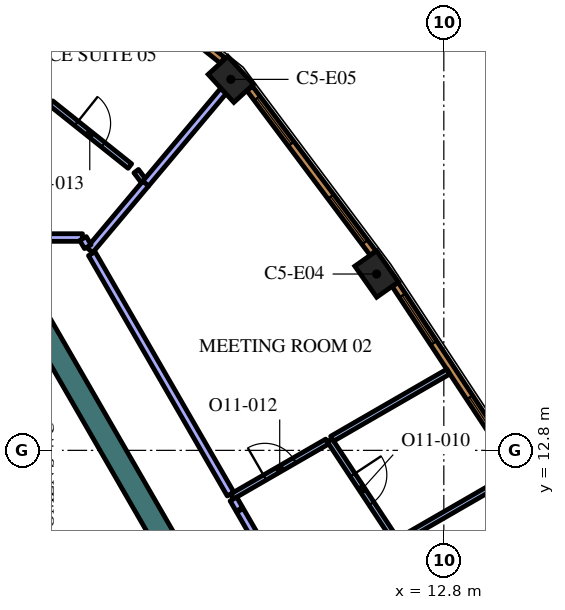
"""IFC4 building model, lengths in metres.
Left out: names, types, materials, properties, quantities, classifications, styles, units other than length and angle.
Written with IfcOpenShell. Run it as: python <this file> out.ifc"""

import sys

from ifc_helpers import new_model, si_unit, direction, frame, frame_2d, origin, origin_2d, place, context, subcontext, project, spatial, rectangle, extrude, element, fill, save


model = new_model("IFC4")
c1 = context("Model", 3, precision=1e-05, world=origin(), true_north=direction((0.0, 1.0)))
c2 = subcontext(c1, "Body", "Model", "MODEL_VIEW")
j1 = project(units=[si_unit("LENGTHUNIT", "METRE"), si_unit("PLANEANGLEUNIT", "RADIAN")], contexts=[c1])
p1 = place(None, origin())
s1 = spatial("IfcSite", under=j1, at=p1, CompositionType="ELEMENT")
p2 = place(p1, origin())
s2 = spatial("IfcBuilding", under=s1, at=p2, CompositionType="ELEMENT")
p3 = place(p2, frame((0.0, 0.0, 267.0)))
s3 = spatial("IfcBuildingStorey", under=s2, at=p3, CompositionType="ELEMENT", Elevation=267.0)
for number, where, z_axis, x_axis in (
    (1, (11.032, 17.44, 0.0), (0.0, 0.0, 1.0), (-0.575, 0.818, 0.0)),
    (2, (7.195, 22.561, 0.0), (0.0, 0.0, 1.0), (-0.676, 0.737, 0.0)),
):
    element("IfcColumn", number, at=place(p3, frame(where, z_axis=z_axis, x_axis=x_axis)), inside=s3, PredefinedType="COLUMN", context=c2, shape_type="SweptSolid", body=[
        extrude(rectangle(XDim=1.0, YDim=0.7, at=origin_2d()), origin(), (0.0, 0.0, 1.0), 4.2),
    ])
p4 = place(p3, frame((1.989, 16.456, 0.0), z_axis=(0.0, 0.0, 1.0), x_axis=(0.499990476767, -0.866030901956, 0.0)))
e3 = element("IfcWall", 3, at=p4, inside=s3, PredefinedType="SOLIDWALL", context=c2, shape_type="SweptSolid", body=[
    extrude(rectangle(XDim=7.438, YDim=0.6, at=frame_2d((3.719, 0.0))), origin(), (0.0, 0.0, 1.0), 4.2),
])
p5 = place(p3, frame((11.564, 10.387, 0.0), z_axis=(0.0, 0.0, 1.0), x_axis=(0.86604641216, 0.499963610661, 0.0)))
e4 = element("IfcWall", 4, at=p5, inside=s3, PredefinedType="PARTITIONING", context=c2, shape_type="SweptSolid", body=[
    extrude(rectangle(XDim=3.096, YDim=0.15, at=frame_2d((1.548, 0.0))), origin(), (0.0, 0.0, 1.0), 3.55),
])
p6 = place(p3, frame((9.795, 13.068, 0.0), z_axis=(0.0, 0.0, 1.0), x_axis=(0.550767347659, -0.834658809786, 0.0)))
e5 = element("IfcWall", 5, at=p6, inside=s3, PredefinedType="PARTITIONING", context=c2, shape_type="SweptSolid", body=[
    extrude(rectangle(XDim=2.999, YDim=0.15, at=frame_2d((1.5, 0.0))), origin(), (0.0, 0.0, 1.0), 3.55),
])
p7 = place(p6, frame((1.099, 0.0, 0.0)))
e6 = element("IfcOpeningElement", 6, at=p7, cuts=e5, PredefinedType="OPENING", context=c2, shape_type="SweptSolid", body=[
    extrude(rectangle(XDim=0.9, YDim=2.1, at=frame_2d((0.45, 1.05))), frame((0.0, 0.085, 0.0), z_axis=(0.0, -1.0, 0.0), x_axis=(1.0, 0.0, 0.0)), (0.0, 0.0, 1.0), 0.17),
])
p8 = place(p3, frame((9.86, 13.106, 0.0), z_axis=(0.0, 0.0, 1.0), x_axis=(0.866022094817, 0.500005731256, 0.0)))
e7 = element("IfcWall", 7, at=p8, inside=s3, PredefinedType="PARTITIONING", context=c2, shape_type="SweptSolid", body=[
    extrude(rectangle(XDim=3.531, YDim=0.15, at=frame_2d((1.766, 0.0))), origin(), (0.0, 0.0, 1.0), 3.55),
])
p9 = place(p3, frame((7.226, 11.585, 0.0), z_axis=(0.0, 0.0, 1.0), x_axis=(0.866021079084, 0.500007490527, 0.0)))
e8 = element("IfcWall", 8, at=p9, inside=s3, PredefinedType="PARTITIONING", context=c2, shape_type="SweptSolid", body=[
    extrude(rectangle(XDim=2.892, YDim=0.15, at=frame_2d((1.446, 0.0))), origin(), (0.0, 0.0, 1.0), 3.55),
])
p10 = place(p9, frame((1.0, 0.0, 0.0)))
e9 = element("IfcOpeningElement", 9, at=p10, cuts=e8, PredefinedType="OPENING", context=c2, shape_type="SweptSolid", body=[
    extrude(rectangle(XDim=0.9, YDim=2.1, at=frame_2d((0.45, 1.05))), frame((0.0, 0.085, 0.0), z_axis=(0.0, -1.0, 0.0), x_axis=(1.0, 0.0, 0.0)), (0.0, 0.0, 1.0), 0.17),
])
p11 = place(p3, frame((13.436, 0.829, 0.0), z_axis=(0.0, 0.0, 1.0), x_axis=(-0.49999894854, 0.866026010844, 0.0)))
e10 = element("IfcWall", 10, at=p11, inside=s3, PredefinedType="PARTITIONING", context=c2, shape_type="SweptSolid", body=[
    extrude(rectangle(XDim=12.0, YDim=0.2, at=frame_2d((6.0, 0.0))), origin(), (0.0, 0.0, 1.0), 3.55),
])
p12 = place(p11, frame((5.5, 0.0, 0.0)))
e11 = element("IfcOpeningElement", 11, at=p12, cuts=e10, PredefinedType="OPENING", context=c2, shape_type="SweptSolid", body=[
    extrude(rectangle(XDim=1.0, YDim=2.1, at=frame_2d((0.5, 1.05))), frame((0.0, 0.11, 0.0), z_axis=(0.0, -1.0, 0.0), x_axis=(1.0, 0.0, 0.0)), (0.0, 0.0, 1.0), 0.22),
])
p13 = place(p3, frame((7.421, 11.247, 0.0), z_axis=(0.0, 0.0, 1.0), x_axis=(-0.500303403544, 0.865850162789, 0.0)))
e12 = element("IfcWall", 12, at=p13, inside=s3, PredefinedType="PARTITIONING", context=c2, shape_type="SweptSolid", body=[
    extrude(rectangle(XDim=0.315, YDim=0.2, at=frame_2d((0.158, 0.0))), origin(), (0.0, 0.0, 1.0), 3.55),
])
p14 = place(p3, frame((4.95, 19.814, 0.0), z_axis=(0.0, 0.0, 1.0), x_axis=(0.642981953866, 0.765881326971, 0.0)))
e13 = element("IfcWall", 13, at=p14, inside=s3, PredefinedType="PARTITIONING", context=c2, shape_type="SweptSolid", body=[
    extrude(rectangle(XDim=3.188, YDim=0.2, at=frame_2d((1.594, 0.0))), origin(), (0.0, 0.0, 1.0), 3.55),
])
p15 = place(p3, frame((3.483, 18.067, 0.0), z_axis=(0.0, 0.0, 1.0), x_axis=(0.642896944312, 0.765952687177, 0.0)))
e14 = element("IfcWall", 14, at=p15, inside=s3, PredefinedType="PARTITIONING", context=c2, shape_type="SweptSolid", body=[
    extrude(rectangle(XDim=2.29, YDim=0.2, at=frame_2d((1.145, 0.0))), origin(), (0.0, 0.0, 1.0), 3.55),
])
p16 = place(p3, frame((7.188, 11.65, 0.0), z_axis=(0.0, 0.0, 1.0), x_axis=(-0.499989634868, 0.866031388014, 0.0)))
e15 = element("IfcWall", 15, at=p16, inside=s3, PredefinedType="PARTITIONING", context=c2, shape_type="SweptSolid", body=[
    extrude(rectangle(XDim=7.303, YDim=0.2, at=frame_2d((3.652, 0.0))), origin(), (0.0, 0.0, 1.0), 3.55),
])
p17 = place(p3, frame((4.891, 19.899, 0.0), z_axis=(0.0, 0.0, 1.0), x_axis=(-0.6, 0.8, 0.0)))
e16 = element("IfcWall", 16, at=p17, inside=s3, PredefinedType="PARTITIONING", context=c2, shape_type="SweptSolid", body=[
    extrude(rectangle(XDim=0.309, YDim=0.15, at=frame_2d((0.154, 0.0))), origin(), (0.0, 0.0, 1.0), 3.55),
])
p18 = place(p3, frame((2.462, 21.937, 0.0), z_axis=(0.0, 0.0, 1.0), x_axis=(0.781630346222, -0.62374193531, 0.0)))
e17 = element("IfcWall", 17, at=p18, inside=s3, PredefinedType="PARTITIONING", context=c2, shape_type="SweptSolid", body=[
    extrude(rectangle(XDim=2.656, YDim=0.15, at=frame_2d((1.328, 0.0))), origin(), (0.0, 0.0, 1.0), 3.55),
])
p19 = place(p18, frame((0.857, 0.0, 0.0)))
e18 = element("IfcOpeningElement", 18, at=p19, cuts=e17, PredefinedType="OPENING", context=c2, shape_type="SweptSolid", body=[
    extrude(rectangle(XDim=0.9, YDim=2.1, at=frame_2d((0.45, 1.05))), frame((0.0, 0.085, 0.0), z_axis=(0.0, -1.0, 0.0), x_axis=(1.0, 0.0, 0.0)), (0.0, 0.0, 1.0), 0.17),
])
p20 = place(p3, frame((3.291, 18.4, 0.0), z_axis=(0.0, 0.0, 1.0), x_axis=(-1.0, 0.0, 0.0)))
e19 = element("IfcWall", 19, at=p20, inside=s3, PredefinedType="PARTITIONING", context=c2, shape_type="SweptSolid", body=[
    extrude(rectangle(XDim=6.582, YDim=0.2, at=frame_2d((3.291, 0.0))), origin(), (0.0, 0.0, 1.0), 3.55),
])
p21 = place(p3, frame((3.43, 18.159, 0.0), z_axis=(0.0, 0.0, 1.0), x_axis=(-0.499949632511, 0.866054481515, 0.0)))
e20 = element("IfcWall", 20, at=p21, inside=s3, PredefinedType="PARTITIONING", context=c2, shape_type="SweptSolid", body=[
    extrude(rectangle(XDim=0.248, YDim=0.2, at=frame_2d((0.124, 0.0))), origin(), (0.0, 0.0, 1.0), 3.55),
])
p22 = place(p3, frame((14.496, 12.653, 0.0), z_axis=(0.0, 0.0, 1.0), x_axis=(-0.550744054781, 0.83467417962, 0.0)))
e21 = element("IfcWall", 21, at=p22, inside=s3, PredefinedType="SOLIDWALL", context=c2, shape_type="SweptSolid", body=[
    extrude(rectangle(XDim=5.406, YDim=0.19, at=frame_2d((2.703, 0.0))), origin(), (0.0, 0.0, 1.0), 3.95),
])
p23 = place(p22, frame((0.346, 0.0, 0.6)))
e22 = element("IfcOpeningElement", 22, at=p23, cuts=e21, PredefinedType="OPENING", context=c2, shape_type="SweptSolid", body=[
    extrude(rectangle(XDim=1.5, YDim=2.85, at=frame_2d((0.75, 1.425))), frame((0.0, 0.105, 0.0), z_axis=(0.0, -1.0, 0.0), x_axis=(1.0, 0.0, 0.0)), (0.0, 0.0, 1.0), 0.21),
])
p24 = place(p22, frame((3.559, 0.0, 0.6)))
e23 = element("IfcOpeningElement", 23, at=p24, cuts=e21, PredefinedType="OPENING", context=c2, shape_type="SweptSolid", body=[
    extrude(rectangle(XDim=1.5, YDim=2.85, at=frame_2d((0.75, 1.425))), frame((0.0, 0.105, 0.0), z_axis=(0.0, -1.0, 0.0), x_axis=(1.0, 0.0, 0.0)), (0.0, 0.0, 1.0), 0.21),
])
p25 = place(p3, frame((10.938, 17.99, 0.0), z_axis=(0.0, 0.0, 1.0), x_axis=(-0.599559865294, 0.800329911929, 0.0)))
e24 = element("IfcWall", 24, at=p25, inside=s3, PredefinedType="SOLIDWALL", context=c2, shape_type="SweptSolid", body=[
    extrude(rectangle(XDim=5.415, YDim=0.19, at=frame_2d((2.708, 0.0))), origin(), (0.0, 0.0, 1.0), 3.95),
])
p26 = place(p25, frame((0.358, 0.0, 0.6)))
e25 = element("IfcOpeningElement", 25, at=p26, cuts=e24, PredefinedType="OPENING", context=c2, shape_type="SweptSolid", body=[
    extrude(rectangle(XDim=1.5, YDim=2.85, at=frame_2d((0.75, 1.425))), frame((0.0, 0.105, 0.0), z_axis=(0.0, -1.0, 0.0), x_axis=(1.0, 0.0, 0.0)), (0.0, 0.0, 1.0), 0.21),
])
p27 = place(p25, frame((3.593, 0.0, 0.6)))
e26 = element("IfcOpeningElement", 26, at=p27, cuts=e24, PredefinedType="OPENING", context=c2, shape_type="SweptSolid", body=[
    extrude(rectangle(XDim=1.5, YDim=2.85, at=frame_2d((0.75, 1.425))), frame((0.0, 0.105, 0.0), z_axis=(0.0, -1.0, 0.0), x_axis=(1.0, 0.0, 0.0)), (0.0, 0.0, 1.0), 0.21),
])
p28 = place(p3, frame((6.977, 23.061, 0.0), z_axis=(0.0, 0.0, 1.0), x_axis=(-0.781626234064, 0.623747088349, 0.0)))
e27 = element("IfcWall", 27, at=p28, inside=s3, PredefinedType="SOLIDWALL", context=c2, shape_type="SweptSolid", body=[
    extrude(rectangle(XDim=3.237, YDim=0.19, at=frame_2d((1.618, 0.0))), origin(), (0.0, 0.0, 1.0), 3.95),
])
p29 = place(p28, frame((1.068, 0.0, 0.6)))
e28 = element("IfcOpeningElement", 28, at=p29, cuts=e27, PredefinedType="OPENING", context=c2, shape_type="SweptSolid", body=[
    extrude(rectangle(XDim=1.1, YDim=2.85, at=frame_2d((0.55, 1.425))), frame((0.0, 0.105, 0.0), z_axis=(0.0, -1.0, 0.0), x_axis=(1.0, 0.0, 0.0)), (0.0, 0.0, 1.0), 0.21),
])
p30 = place(p7, origin())
e29 = element("IfcDoor", 29, at=p30, inside=s3, OperationType="SINGLE_SWING_RIGHT", PredefinedType="DOOR", context=c2, shape_type="SweptSolid", body=[
    extrude(rectangle(XDim=0.9, YDim=2.1, at=frame_2d((0.45, 1.05))), frame((0.0, 0.025, 0.0), z_axis=(0.0, -1.0, 0.0), x_axis=(1.0, 0.0, 0.0)), (0.0, 0.0, 1.0), 0.05),
])
fill(e6, e29)
p31 = place(p10, origin())
e30 = element("IfcDoor", 30, at=p31, inside=s3, OperationType="SINGLE_SWING_RIGHT", PredefinedType="DOOR", context=c2, shape_type="SweptSolid", body=[
    extrude(rectangle(XDim=0.9, YDim=2.1, at=frame_2d((0.45, 1.05))), frame((0.0, 0.025, 0.0), z_axis=(0.0, -1.0, 0.0), x_axis=(1.0, 0.0, 0.0)), (0.0, 0.0, 1.0), 0.05),
])
fill(e9, e30)
p32 = place(p19, origin())
e31 = element("IfcDoor", 31, at=p32, inside=s3, OperationType="SINGLE_SWING_LEFT", PredefinedType="DOOR", context=c2, shape_type="SweptSolid", body=[
    extrude(rectangle(XDim=0.9, YDim=2.1, at=frame_2d((0.45, 1.05))), frame((0.0, 0.025, 0.0), z_axis=(0.0, -1.0, 0.0), x_axis=(1.0, 0.0, 0.0)), (0.0, 0.0, 1.0), 0.05),
])
fill(e18, e31)
p33 = place(p23, origin())
e32 = element("IfcWindow", 32, at=p33, inside=s3, PartitioningType="SINGLE_PANEL", PredefinedType="WINDOW", context=c2, shape_type="SweptSolid", body=[
    extrude(rectangle(XDim=1.5, YDim=2.85, at=frame_2d((0.75, 1.425))), frame((0.0, 0.045, 0.0), z_axis=(0.0, -1.0, 0.0), x_axis=(1.0, 0.0, 0.0)), (0.0, 0.0, 1.0), 0.06),
])
fill(e22, e32)
p34 = place(p24, origin())
e33 = element("IfcWindow", 33, at=p34, inside=s3, PartitioningType="SINGLE_PANEL", PredefinedType="WINDOW", context=c2, shape_type="SweptSolid", body=[
    extrude(rectangle(XDim=1.5, YDim=2.85, at=frame_2d((0.75, 1.425))), frame((0.0, 0.045, 0.0), z_axis=(0.0, -1.0, 0.0), x_axis=(1.0, 0.0, 0.0)), (0.0, 0.0, 1.0), 0.06),
])
fill(e23, e33)
p35 = place(p26, origin())
e34 = element("IfcWindow", 34, at=p35, inside=s3, PartitioningType="SINGLE_PANEL", PredefinedType="WINDOW", context=c2, shape_type="SweptSolid", body=[
    extrude(rectangle(XDim=1.5, YDim=2.85, at=frame_2d((0.75, 1.425))), frame((0.0, 0.045, 0.0), z_axis=(0.0, -1.0, 0.0), x_axis=(1.0, 0.0, 0.0)), (0.0, 0.0, 1.0), 0.06),
])
fill(e25, e34)
p36 = place(p27, origin())
e35 = element("IfcWindow", 35, at=p36, inside=s3, PartitioningType="SINGLE_PANEL", PredefinedType="WINDOW", context=c2, shape_type="SweptSolid", body=[
    extrude(rectangle(XDim=1.5, YDim=2.85, at=frame_2d((0.75, 1.425))), frame((0.0, 0.045, 0.0), z_axis=(0.0, -1.0, 0.0), x_axis=(1.0, 0.0, 0.0)), (0.0, 0.0, 1.0), 0.06),
])
fill(e26, e35)
save(model, sys.argv[1])
